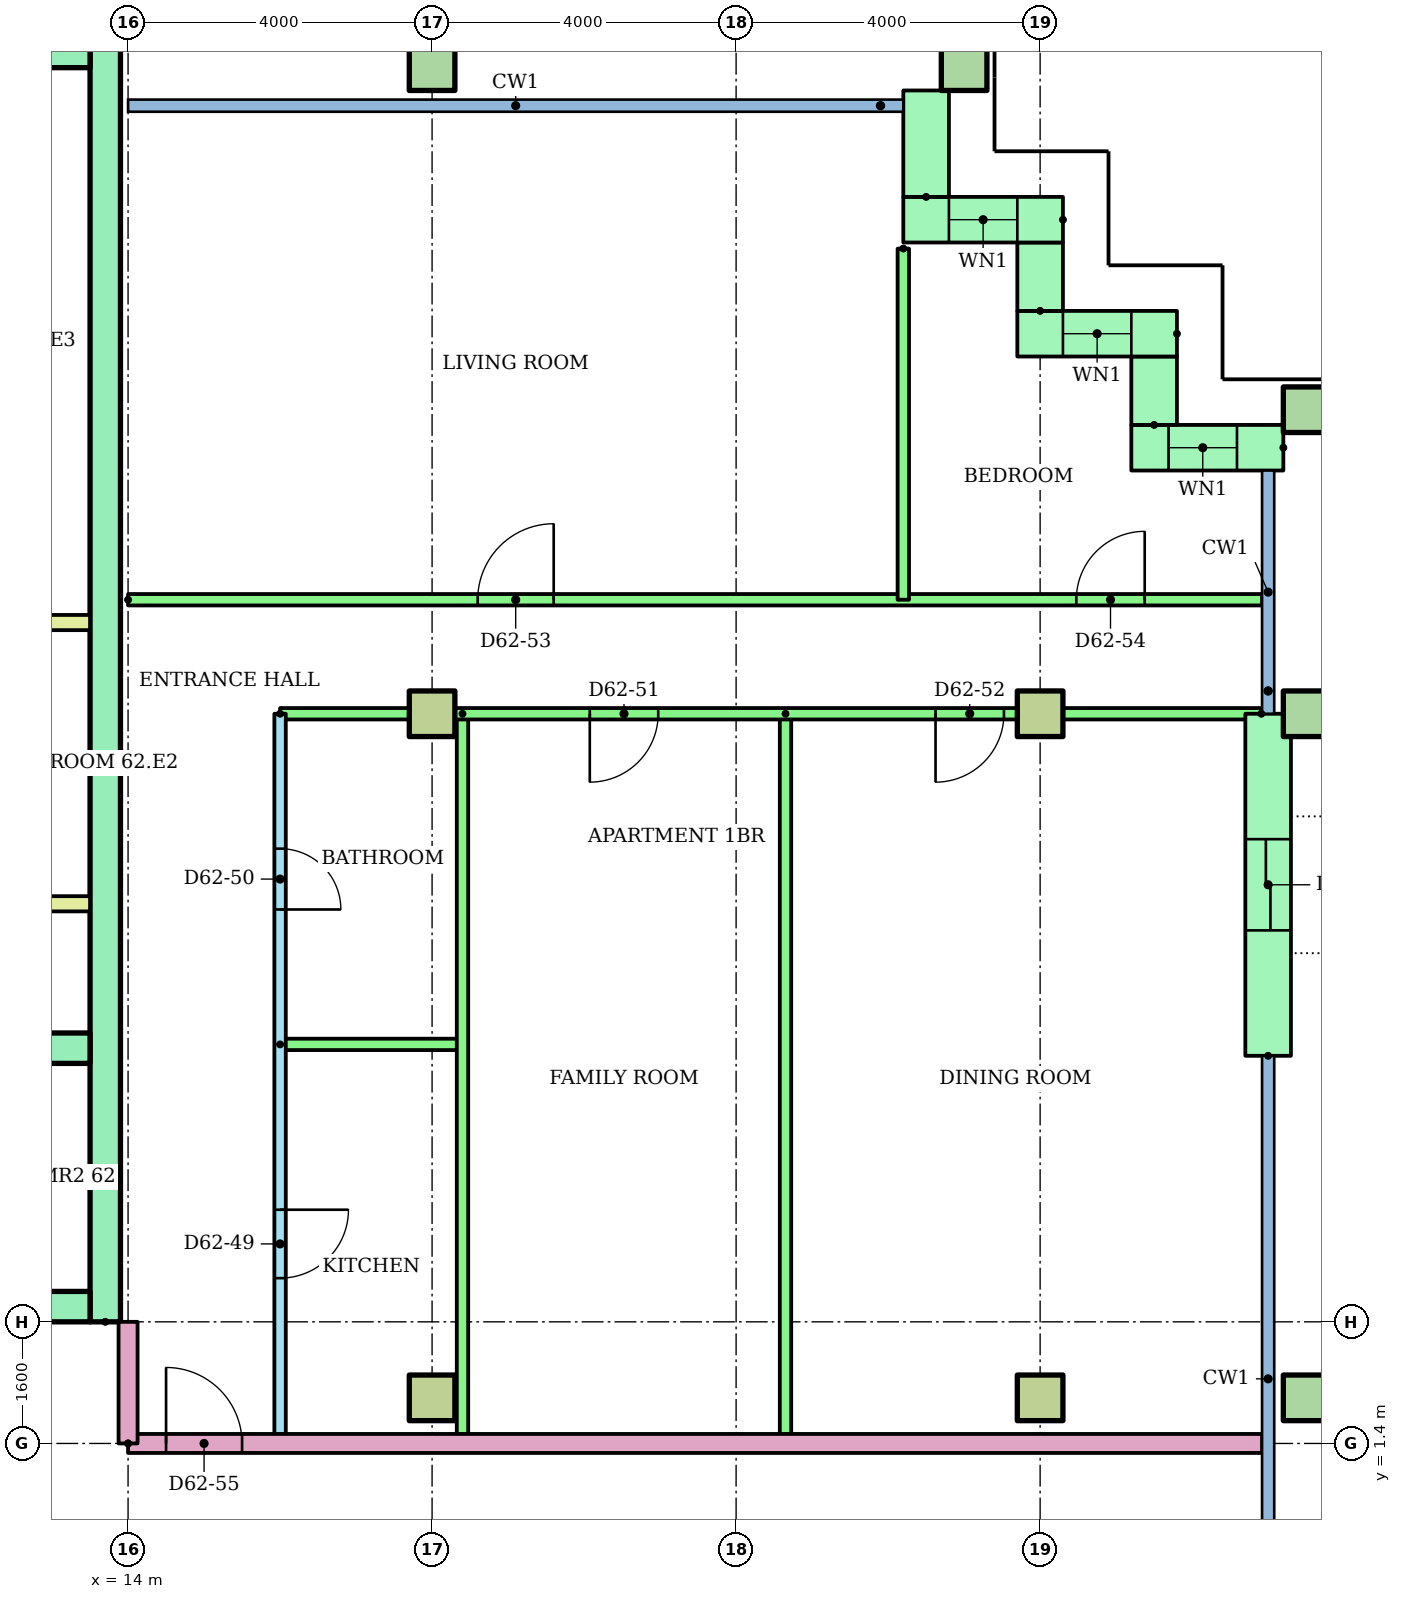
"""IFC4 building model, lengths in metres.
Left out: names, types, materials, properties, quantities, classifications, styles, units other than length and angle.
Written with IfcOpenShell. Run it as: python <this file> out.ifc"""

import sys

from ifc_helpers import new_model, si_unit, direction, frame, frame_2d, origin, origin_2d, place, context, subcontext, project, spatial, rectangle, hollow_rectangle, extrude, element, fill, save


model = new_model("IFC4")
c1 = context("Model", 3, precision=1e-05, world=origin(), true_north=direction((0.0, 1.0)))
c2 = subcontext(c1, "Body", "Model", "MODEL_VIEW")
j1 = project(units=[si_unit("LENGTHUNIT", "METRE"), si_unit("PLANEANGLEUNIT", "RADIAN")], contexts=[c1])
p1 = place(None, origin())
s1 = spatial("IfcSite", under=j1, at=p1, CompositionType="ELEMENT")
p2 = place(p1, origin())
s2 = spatial("IfcBuilding", under=s1, at=p2, CompositionType="ELEMENT")
p3 = place(p2, frame((0.0, 0.0, 236.4)))
s3 = spatial("IfcBuildingStorey", under=s2, at=p3, CompositionType="ELEMENT", Elevation=236.4)
for number, where in (
    (1, (18.0, 2.0, 0.0)),
    (2, (26.0, 2.0, 0.0)),
):
    element("IfcColumn", number, at=place(p3, frame(where)), inside=s3, PredefinedType="COLUMN", context=c2, shape_type="SweptSolid", body=[
        extrude(rectangle(XDim=0.6, YDim=0.6, at=origin_2d()), origin(), (0.0, 0.0, 1.0), 3.2),
    ])
p4 = place(p3, frame((29.5, 2.0, 0.0)))
e3 = element("IfcColumn", 3, at=p4, inside=s3, PredefinedType="COLUMN", context=c2, shape_type="SweptSolid", body=[
    extrude(hollow_rectangle(XDim=0.6, YDim=0.6, WallThickness=0.03, at=origin_2d()), origin(), (0.0, 0.0, 1.0), 3.2),
])
for number, where in (
    (4, (18.0, 11.0, 0.0)),
    (5, (26.0, 11.0, 0.0)),
):
    element("IfcColumn", number, at=place(p3, frame(where)), inside=s3, PredefinedType="COLUMN", context=c2, shape_type="SweptSolid", body=[
        extrude(rectangle(XDim=0.6, YDim=0.6, at=origin_2d()), origin(), (0.0, 0.0, 1.0), 3.2),
    ])
for number, where in (
    (6, (29.5, 11.0, 0.0)),
    (7, (29.5, 15.0, 0.0)),
    (8, (18.0, 19.5, 0.0)),
    (9, (25.0, 19.5, 0.0)),
):
    element("IfcColumn", number, at=place(p3, frame(where)), inside=s3, PredefinedType="COLUMN", context=c2, shape_type="SweptSolid", body=[
        extrude(hollow_rectangle(XDim=0.6, YDim=0.6, WallThickness=0.03, at=origin_2d()), origin(), (0.0, 0.0, 1.0), 3.2),
    ])
p5 = place(p3, frame((29.2, 14.5, 0.0), z_axis=(0.0, 0.0, 1.0), x_axis=(-1.0, 0.0, 0.0)))
e10 = element("IfcWall", 10, at=p5, inside=s3, PredefinedType="STANDARD", context=c2, shape_type="SweptSolid", body=[
    extrude(rectangle(XDim=2.0, YDim=0.6, at=frame_2d((1.0, 0.0))), origin(), (0.0, 0.0, 1.0), 2.8),
])
p6 = place(p5, frame((0.61, 0.0, 0.9)))
e11 = element("IfcOpeningElement", 11, at=p6, cuts=e10, PredefinedType="OPENING", context=c2, shape_type="SweptSolid", body=[
    extrude(rectangle(XDim=0.9, YDim=1.5, at=frame_2d((0.45, 0.75))), frame((0.0, 0.31, 0.0), z_axis=(0.0, -1.0, 0.0), x_axis=(1.0, 0.0, 0.0)), (0.0, 0.0, 1.0), 0.62),
])
p7 = place(p3, frame((27.5, 14.8, 0.0), z_axis=(0.0, 0.0, 1.0), x_axis=(0.0, 1.0, 0.0)))
e12 = element("IfcWall", 12, at=p7, inside=s3, PredefinedType="STANDARD", context=c2, shape_type="SweptSolid", body=[
    extrude(rectangle(XDim=0.9, YDim=0.6, at=frame_2d((0.45, 0.0))), origin(), (0.0, 0.0, 1.0), 2.8),
])
p8 = place(p3, frame((27.8, 16.0, 0.0), z_axis=(0.0, 0.0, 1.0), x_axis=(-1.0, 0.0, 0.0)))
e13 = element("IfcWall", 13, at=p8, inside=s3, PredefinedType="STANDARD", context=c2, shape_type="SweptSolid", body=[
    extrude(rectangle(XDim=2.1, YDim=0.6, at=frame_2d((1.05, 0.0))), origin(), (0.0, 0.0, 1.0), 2.8),
])
p9 = place(p8, frame((0.6, 0.0, 0.9)))
e14 = element("IfcOpeningElement", 14, at=p9, cuts=e13, PredefinedType="OPENING", context=c2, shape_type="SweptSolid", body=[
    extrude(rectangle(XDim=0.9, YDim=1.5, at=frame_2d((0.45, 0.75))), frame((0.0, 0.31, 0.0), z_axis=(0.0, -1.0, 0.0), x_axis=(1.0, 0.0, 0.0)), (0.0, 0.0, 1.0), 0.62),
])
p10 = place(p3, frame((26.0, 16.3, 0.0), z_axis=(0.0, 0.0, 1.0), x_axis=(0.0, 1.0, 0.0)))
e15 = element("IfcWall", 15, at=p10, inside=s3, PredefinedType="STANDARD", context=c2, shape_type="SweptSolid", body=[
    extrude(rectangle(XDim=0.9, YDim=0.6, at=frame_2d((0.45, 0.0))), origin(), (0.0, 0.0, 1.0), 2.8),
])
p11 = place(p3, frame((26.3, 17.5, 0.0), z_axis=(0.0, 0.0, 1.0), x_axis=(-1.0, 0.0, 0.0)))
e16 = element("IfcWall", 16, at=p11, inside=s3, PredefinedType="STANDARD", context=c2, shape_type="SweptSolid", body=[
    extrude(rectangle(XDim=2.1, YDim=0.6, at=frame_2d((1.05, 0.0))), origin(), (0.0, 0.0, 1.0), 2.8),
])
p12 = place(p11, frame((0.6, 0.0, 0.9)))
e17 = element("IfcOpeningElement", 17, at=p12, cuts=e16, PredefinedType="OPENING", context=c2, shape_type="SweptSolid", body=[
    extrude(rectangle(XDim=0.9, YDim=1.5, at=frame_2d((0.45, 0.75))), frame((0.0, 0.31, 0.0), z_axis=(0.0, -1.0, 0.0), x_axis=(1.0, 0.0, 0.0)), (0.0, 0.0, 1.0), 0.62),
])
p13 = place(p3, frame((24.5, 17.8, 0.0), z_axis=(0.0, 0.0, 1.0), x_axis=(0.0, 1.0, 0.0)))
e18 = element("IfcWall", 18, at=p13, inside=s3, PredefinedType="STANDARD", context=c2, shape_type="SweptSolid", body=[
    extrude(rectangle(XDim=1.4, YDim=0.6, at=frame_2d((0.7, 0.0))), origin(), (0.0, 0.0, 1.0), 2.8),
])
p14 = place(p3, frame((29.0, 6.5, 0.0), z_axis=(0.0, 0.0, 1.0), x_axis=(0.0, 1.0, 0.0)))
e19 = element("IfcWall", 19, at=p14, inside=s3, PredefinedType="STANDARD", context=c2, shape_type="SweptSolid", body=[
    extrude(rectangle(XDim=4.5, YDim=0.6, at=frame_2d((2.25, 0.0))), origin(), (0.0, 0.0, 1.0), 2.8),
])
p15 = place(p14, frame((1.65, 0.0, 0.0)))
e20 = element("IfcOpeningElement", 20, at=p15, cuts=e19, PredefinedType="OPENING", context=c2, shape_type="SweptSolid", body=[
    extrude(rectangle(XDim=1.2, YDim=2.1, at=frame_2d((0.6, 1.05))), frame((0.0, 0.31, 0.0), z_axis=(0.0, -1.0, 0.0), x_axis=(1.0, 0.0, 0.0)), (0.0, 0.0, 1.0), 0.62),
])
p16 = place(p3, frame((13.7, 3.0, 0.0), z_axis=(0.0, 0.0, 1.0), x_axis=(0.0, 1.0, 0.0)))
e21 = element("IfcWall", 21, at=p16, inside=s3, PredefinedType="SHEAR", context=c2, shape_type="SweptSolid", body=[
    extrude(rectangle(XDim=17.0, YDim=0.4, at=frame_2d((8.5, 0.0))), origin(), (0.0, 0.0, 1.0), 2.8),
])
p17 = place(p3, frame((-13.5, 19.7, 0.0)))
e22 = element("IfcWall", 22, at=p17, inside=s3, PredefinedType="SHEAR", context=c2, shape_type="SweptSolid", body=[
    extrude(rectangle(XDim=27.0, YDim=0.4, at=frame_2d((13.5, 0.0))), origin(), (0.0, 0.0, 1.0), 2.8),
])
p18 = place(p3, frame((-13.5, 3.2, 0.0)))
e23 = element("IfcWall", 23, at=p18, inside=s3, PredefinedType="SHEAR", context=c2, shape_type="SweptSolid", body=[
    extrude(rectangle(XDim=27.0, YDim=0.4, at=frame_2d((13.5, 0.0))), origin(), (0.0, 0.0, 1.0), 2.8),
])
p19 = place(p18, frame((22.083, 0.0, 0.0)))
e24 = element("IfcOpeningElement", 24, at=p19, cuts=e23, PredefinedType="OPENING", context=c2, shape_type="SweptSolid", body=[
    extrude(rectangle(XDim=1.1, YDim=2.1, at=frame_2d((0.55, 1.05))), frame((0.0, 0.21, 0.0), z_axis=(0.0, -1.0, 0.0), x_axis=(1.0, 0.0, 0.0)), (0.0, 0.0, 1.0), 0.42),
])
p20 = place(p18, frame((25.128, 0.0, 0.0)))
e25 = element("IfcOpeningElement", 25, at=p20, cuts=e23, PredefinedType="OPENING", context=c2, shape_type="SweptSolid", body=[
    extrude(rectangle(XDim=1.1, YDim=2.1, at=frame_2d((0.55, 1.05))), frame((0.0, 0.21, 0.0), z_axis=(0.0, -1.0, 0.0), x_axis=(1.0, 0.0, 0.0)), (0.0, 0.0, 1.0), 0.42),
])
p21 = place(p18, frame((12.6, 0.0, 0.0)))
e26 = element("IfcOpeningElement", 26, at=p21, cuts=e23, PredefinedType="OPENING", context=c2, shape_type="SweptSolid", body=[
    extrude(rectangle(XDim=1.8, YDim=2.1, at=frame_2d((0.9, 1.05))), frame((0.0, 0.21, 0.0), z_axis=(0.0, -1.0, 0.0), x_axis=(1.0, 0.0, 0.0)), (0.0, 0.0, 1.0), 0.42),
])
p22 = place(p3, frame((1.522, 6.6, 0.0)))
e27 = element("IfcWall", 27, at=p22, inside=s3, PredefinedType="SHEAR", context=c2, shape_type="SweptSolid", body=[
    extrude(rectangle(XDim=11.978, YDim=0.4, at=frame_2d((5.989, 0.0))), origin(), (0.0, 0.0, 1.0), 2.8),
])
p23 = place(p22, frame((1.022, 0.0, 0.0)))
e28 = element("IfcOpeningElement", 28, at=p23, cuts=e27, PredefinedType="OPENING", context=c2, shape_type="SweptSolid", body=[
    extrude(rectangle(XDim=1.0, YDim=2.1, at=frame_2d((0.5, 1.05))), frame((0.0, 0.21, 0.0), z_axis=(0.0, -1.0, 0.0), x_axis=(1.0, 0.0, 0.0)), (0.0, 0.0, 1.0), 0.42),
])
p24 = place(p22, frame((4.067, 0.0, 0.0)))
e29 = element("IfcOpeningElement", 29, at=p24, cuts=e27, PredefinedType="OPENING", context=c2, shape_type="SweptSolid", body=[
    extrude(rectangle(XDim=1.0, YDim=2.1, at=frame_2d((0.5, 1.05))), frame((0.0, 0.21, 0.0), z_axis=(0.0, -1.0, 0.0), x_axis=(1.0, 0.0, 0.0)), (0.0, 0.0, 1.0), 0.42),
])
for number, where in (
    (30, (9.6, 8.5, 0.0)),
    (31, (9.6, 12.2, 0.0)),
):
    element("IfcWall", number, at=place(p3, frame(where)), inside=s3, PredefinedType="PARTITIONING", context=c2, shape_type="SweptSolid", body=[
        extrude(rectangle(XDim=3.9, YDim=0.2, at=frame_2d((1.95, 0.0))), origin(), (0.0, 0.0, 1.0), 2.8),
    ])
p25 = place(p3, frame((16.0, 11.0, 0.0), z_axis=(0.0, 0.0, 1.0), x_axis=(0.0, -1.0, 0.0)))
e32 = element("IfcWall", 32, at=p25, inside=s3, PredefinedType="PARTITIONING", context=c2, shape_type="SweptSolid", body=[
    extrude(rectangle(XDim=9.6, YDim=0.15, at=frame_2d((4.8, 0.0))), origin(), (0.0, 0.0, 1.0), 2.4),
])
p26 = place(p25, frame((6.525, 0.0, 0.0)))
e33 = element("IfcOpeningElement", 33, at=p26, cuts=e32, PredefinedType="OPENING", context=c2, shape_type="SweptSolid", body=[
    extrude(rectangle(XDim=0.9, YDim=2.1, at=frame_2d((0.45, 1.05))), frame((0.0, 0.085, 0.0), z_axis=(0.0, -1.0, 0.0), x_axis=(1.0, 0.0, 0.0)), (0.0, 0.0, 1.0), 0.17),
])
p27 = place(p25, frame((1.775, 0.0, 0.0)))
e34 = element("IfcOpeningElement", 34, at=p27, cuts=e32, PredefinedType="OPENING", context=c2, shape_type="SweptSolid", body=[
    extrude(rectangle(XDim=0.8, YDim=2.1, at=frame_2d((0.4, 1.05))), frame((0.0, 0.085, 0.0), z_axis=(0.0, -1.0, 0.0), x_axis=(1.0, 0.0, 0.0)), (0.0, 0.0, 1.0), 0.17),
])
p28 = place(p3, frame((16.0, 6.65, 0.0)))
e35 = element("IfcWall", 35, at=p28, inside=s3, PredefinedType="PARTITIONING", context=c2, shape_type="SweptSolid", body=[
    extrude(rectangle(XDim=2.4, YDim=0.15, at=frame_2d((1.2, 0.0))), origin(), (0.0, 0.0, 1.0), 2.4),
])
for number, where, z_axis, x_axis in (
    (36, (18.4, 11.0, 0.0), (0.0, 0.0, 1.0), (0.0, -1.0, 0.0)),
    (37, (22.65, 11.0, 0.0), (0.0, 0.0, 1.0), (0.0, -1.0, 0.0)),
):
    element("IfcWall", number, at=place(p3, frame(where, z_axis=z_axis, x_axis=x_axis)), inside=s3, PredefinedType="PARTITIONING", context=c2, shape_type="SweptSolid", body=[
        extrude(rectangle(XDim=9.6, YDim=0.15, at=frame_2d((4.8, 0.0))), origin(), (0.0, 0.0, 1.0), 2.4),
    ])
p29 = place(p3, frame((28.91, 11.0, 0.0), z_axis=(0.0, 0.0, 1.0), x_axis=(-1.0, 0.0, 0.0)))
e38 = element("IfcWall", 38, at=p29, inside=s3, PredefinedType="PARTITIONING", context=c2, shape_type="SweptSolid", body=[
    extrude(rectangle(XDim=12.91, YDim=0.15, at=frame_2d((6.455, 0.0))), origin(), (0.0, 0.0, 1.0), 2.4),
])
p30 = place(p29, frame((7.935, 0.0, 0.0)))
e39 = element("IfcOpeningElement", 39, at=p30, cuts=e38, PredefinedType="OPENING", context=c2, shape_type="SweptSolid", body=[
    extrude(rectangle(XDim=0.9, YDim=2.1, at=frame_2d((0.45, 1.05))), frame((0.0, 0.085, 0.0), z_axis=(0.0, -1.0, 0.0), x_axis=(1.0, 0.0, 0.0)), (0.0, 0.0, 1.0), 0.17),
])
p31 = place(p29, frame((3.386, 0.0, 0.0)))
e40 = element("IfcOpeningElement", 40, at=p31, cuts=e38, PredefinedType="OPENING", context=c2, shape_type="SweptSolid", body=[
    extrude(rectangle(XDim=0.9, YDim=2.1, at=frame_2d((0.45, 1.05))), frame((0.0, 0.085, 0.0), z_axis=(0.0, -1.0, 0.0), x_axis=(1.0, 0.0, 0.0)), (0.0, 0.0, 1.0), 0.17),
])
p32 = place(p3, frame((14.0, 12.5, 0.0)))
e41 = element("IfcWall", 41, at=p32, inside=s3, PredefinedType="PARTITIONING", context=c2, shape_type="SweptSolid", body=[
    extrude(rectangle(XDim=14.92, YDim=0.15, at=frame_2d((7.46, 0.0))), origin(), (0.0, 0.0, 1.0), 2.4),
])
p33 = place(p32, frame((4.6, 0.0, 0.0)))
e42 = element("IfcOpeningElement", 42, at=p33, cuts=e41, PredefinedType="OPENING", context=c2, shape_type="SweptSolid", body=[
    extrude(rectangle(XDim=1.0, YDim=2.1, at=frame_2d((0.5, 1.05))), frame((0.0, 0.085, 0.0), z_axis=(0.0, -1.0, 0.0), x_axis=(1.0, 0.0, 0.0)), (0.0, 0.0, 1.0), 0.17),
])
p34 = place(p32, frame((12.476, 0.0, 0.0)))
e43 = element("IfcOpeningElement", 43, at=p34, cuts=e41, PredefinedType="OPENING", context=c2, shape_type="SweptSolid", body=[
    extrude(rectangle(XDim=0.9, YDim=2.1, at=frame_2d((0.45, 1.05))), frame((0.0, 0.085, 0.0), z_axis=(0.0, -1.0, 0.0), x_axis=(1.0, 0.0, 0.0)), (0.0, 0.0, 1.0), 0.17),
])
p35 = place(p3, frame((24.2, 17.12, 0.0), z_axis=(0.0, 0.0, 1.0), x_axis=(0.0, -1.0, 0.0)))
e44 = element("IfcWall", 44, at=p35, inside=s3, PredefinedType="PARTITIONING", context=c2, shape_type="SweptSolid", body=[
    extrude(rectangle(XDim=4.62, YDim=0.15, at=frame_2d((2.31, 0.0))), origin(), (0.0, 0.0, 1.0), 2.4),
])
p36 = place(p3, frame((14.0, 1.4, 0.0)))
e45 = element("IfcWall", 45, at=p36, inside=s3, PredefinedType="PARTITIONING", context=c2, shape_type="SweptSolid", body=[
    extrude(rectangle(XDim=14.92, YDim=0.25, at=frame_2d((7.46, 0.0))), origin(), (0.0, 0.0, 1.0), 2.4),
])
p37 = place(p36, frame((0.5, 0.0, 0.0)))
e46 = element("IfcOpeningElement", 46, at=p37, cuts=e45, PredefinedType="OPENING", context=c2, shape_type="SweptSolid", body=[
    extrude(rectangle(XDim=1.0, YDim=2.1, at=frame_2d((0.5, 1.05))), frame((0.0, 0.135, 0.0), z_axis=(0.0, -1.0, 0.0), x_axis=(1.0, 0.0, 0.0)), (0.0, 0.0, 1.0), 0.27),
])
p38 = place(p3, frame((14.0, 1.4, 0.0), z_axis=(0.0, 0.0, 1.0), x_axis=(0.0, 1.0, 0.0)))
e47 = element("IfcWall", 47, at=p38, inside=s3, PredefinedType="PARTITIONING", context=c2, shape_type="SweptSolid", body=[
    extrude(rectangle(XDim=1.6, YDim=0.25, at=frame_2d((0.8, 0.0))), origin(), (0.0, 0.0, 1.0), 2.4),
])
p39 = place(p6, origin())
e48 = element("IfcWindow", 48, at=p39, inside=s3, PartitioningType="SINGLE_PANEL", PredefinedType="WINDOW", context=c2, shape_type="SweptSolid", body=[
    extrude(rectangle(XDim=0.9, YDim=1.5, at=frame_2d((0.45, 0.75))), frame((0.0, 0.03, 0.0), z_axis=(0.0, -1.0, 0.0), x_axis=(1.0, 0.0, 0.0)), (0.0, 0.0, 1.0), 0.06),
])
fill(e11, e48)
p40 = place(p9, origin())
e49 = element("IfcWindow", 49, at=p40, inside=s3, PartitioningType="SINGLE_PANEL", PredefinedType="WINDOW", context=c2, shape_type="SweptSolid", body=[
    extrude(rectangle(XDim=0.9, YDim=1.5, at=frame_2d((0.45, 0.75))), frame((0.0, 0.03, 0.0), z_axis=(0.0, -1.0, 0.0), x_axis=(1.0, 0.0, 0.0)), (0.0, 0.0, 1.0), 0.06),
])
fill(e14, e49)
p41 = place(p12, origin())
e50 = element("IfcWindow", 50, at=p41, inside=s3, PartitioningType="SINGLE_PANEL", PredefinedType="WINDOW", context=c2, shape_type="SweptSolid", body=[
    extrude(rectangle(XDim=0.9, YDim=1.5, at=frame_2d((0.45, 0.75))), frame((0.0, 0.03, 0.0), z_axis=(0.0, -1.0, 0.0), x_axis=(1.0, 0.0, 0.0)), (0.0, 0.0, 1.0), 0.06),
])
fill(e17, e50)
p42 = place(p26, origin())
e51 = element("IfcDoor", 51, at=p42, inside=s3, OperationType="SINGLE_SWING_LEFT", PredefinedType="DOOR", context=c2, shape_type="SweptSolid", body=[
    extrude(rectangle(XDim=0.9, YDim=2.1, at=frame_2d((0.45, 1.05))), frame((0.0, 0.025, 0.0), z_axis=(0.0, -1.0, 0.0), x_axis=(1.0, 0.0, 0.0)), (0.0, 0.0, 1.0), 0.05),
])
fill(e33, e51)
p43 = place(p27, origin())
e52 = element("IfcDoor", 52, at=p43, inside=s3, OperationType="SINGLE_SWING_RIGHT", PredefinedType="DOOR", context=c2, shape_type="SweptSolid", body=[
    extrude(rectangle(XDim=0.8, YDim=2.1, at=frame_2d((0.4, 1.05))), frame((0.0, 0.025, 0.0), z_axis=(0.0, -1.0, 0.0), x_axis=(1.0, 0.0, 0.0)), (0.0, 0.0, 1.0), 0.05),
])
fill(e34, e52)
p44 = place(p30, origin())
e53 = element("IfcDoor", 53, at=p44, inside=s3, OperationType="SINGLE_SWING_RIGHT", PredefinedType="DOOR", context=c2, shape_type="SweptSolid", body=[
    extrude(rectangle(XDim=0.9, YDim=2.1, at=frame_2d((0.45, 1.05))), frame((0.0, 0.025, 0.0), z_axis=(0.0, -1.0, 0.0), x_axis=(1.0, 0.0, 0.0)), (0.0, 0.0, 1.0), 0.05),
])
fill(e39, e53)
p45 = place(p31, origin())
e54 = element("IfcDoor", 54, at=p45, inside=s3, OperationType="SINGLE_SWING_RIGHT", PredefinedType="DOOR", context=c2, shape_type="SweptSolid", body=[
    extrude(rectangle(XDim=0.9, YDim=2.1, at=frame_2d((0.45, 1.05))), frame((0.0, 0.025, 0.0), z_axis=(0.0, -1.0, 0.0), x_axis=(1.0, 0.0, 0.0)), (0.0, 0.0, 1.0), 0.05),
])
fill(e40, e54)
p46 = place(p33, origin())
e55 = element("IfcDoor", 55, at=p46, inside=s3, OperationType="SINGLE_SWING_RIGHT", PredefinedType="DOOR", context=c2, shape_type="SweptSolid", body=[
    extrude(rectangle(XDim=1.0, YDim=2.1, at=frame_2d((0.5, 1.05))), frame((0.0, 0.025, 0.0), z_axis=(0.0, -1.0, 0.0), x_axis=(1.0, 0.0, 0.0)), (0.0, 0.0, 1.0), 0.05),
])
fill(e42, e55)
p47 = place(p34, origin())
e56 = element("IfcDoor", 56, at=p47, inside=s3, OperationType="SINGLE_SWING_RIGHT", PredefinedType="DOOR", context=c2, shape_type="SweptSolid", body=[
    extrude(rectangle(XDim=0.9, YDim=2.1, at=frame_2d((0.45, 1.05))), frame((0.0, 0.025, 0.0), z_axis=(0.0, -1.0, 0.0), x_axis=(1.0, 0.0, 0.0)), (0.0, 0.0, 1.0), 0.05),
])
fill(e43, e56)
p48 = place(p37, origin())
e57 = element("IfcDoor", 57, at=p48, inside=s3, OperationType="SINGLE_SWING_LEFT", PredefinedType="DOOR", context=c2, shape_type="SweptSolid", body=[
    extrude(rectangle(XDim=1.0, YDim=2.1, at=frame_2d((0.5, 1.05))), frame((0.0, 0.025, 0.0), z_axis=(0.0, -1.0, 0.0), x_axis=(1.0, 0.0, 0.0)), (0.0, 0.0, 1.0), 0.05),
])
fill(e46, e57)
p49 = place(p15, origin())
e58 = element("IfcDoor", 58, at=p49, inside=s3, OperationType="SLIDING_TO_LEFT", PredefinedType="DOOR", context=c2, shape_type="SweptSolid", body=[
    extrude(rectangle(XDim=1.2, YDim=2.1, at=frame_2d((0.6, 1.05))), frame((0.0, 0.025, 0.0), z_axis=(0.0, -1.0, 0.0), x_axis=(1.0, 0.0, 0.0)), (0.0, 0.0, 1.0), 0.05),
])
fill(e20, e58)
save(model, sys.argv[1])
